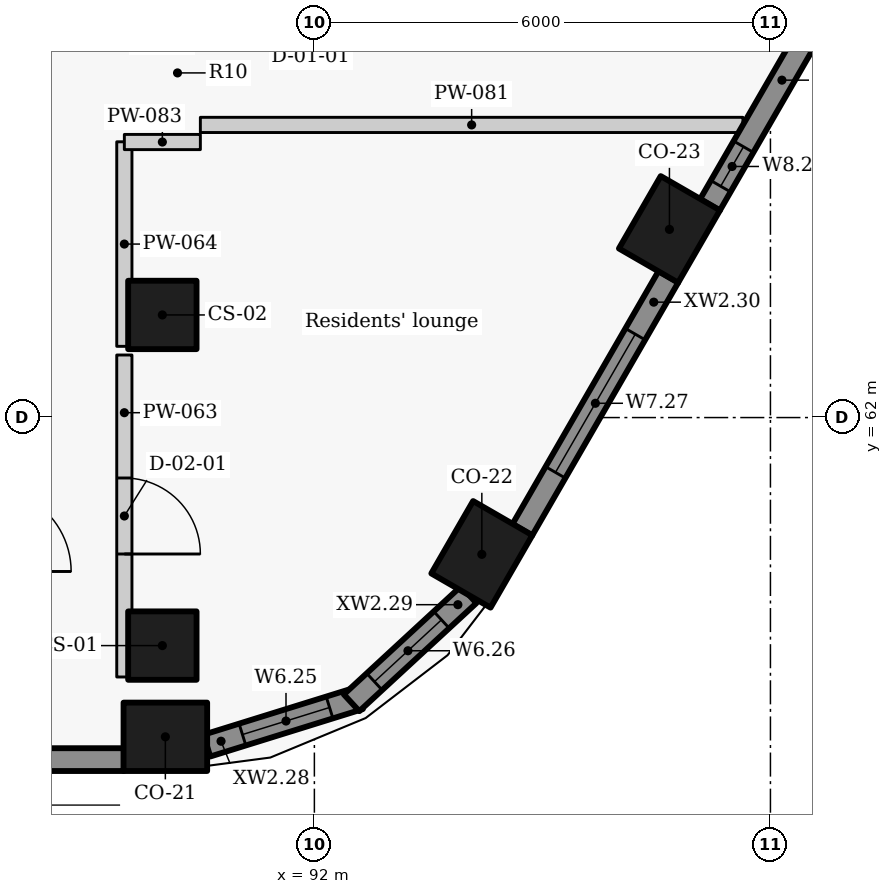
"""IFC4 building model, lengths in metres.
Left out: names, types, materials, properties, quantities, classifications, styles, units other than length and angle.
Written with IfcOpenShell. Run it as: python <this file> out.ifc"""

import sys

from ifc_helpers import new_model, si_unit, direction, frame, frame_2d, origin, origin_2d, place, context, subcontext, project, spatial, rectangle, extrude, element, fill, save


model = new_model("IFC4")
c1 = context("Model", 3, precision=1e-05, world=origin(), true_north=direction((0.0, 1.0)))
c2 = subcontext(c1, "Body", "Model", "MODEL_VIEW")
j1 = project(units=[si_unit("LENGTHUNIT", "METRE"), si_unit("PLANEANGLEUNIT", "RADIAN")], contexts=[c1])
p1 = place(None, origin())
s1 = spatial("IfcSite", under=j1, at=p1, CompositionType="ELEMENT")
p2 = place(p1, origin())
s2 = spatial("IfcBuilding", under=s1, at=p2, CompositionType="ELEMENT")
p3 = place(p2, frame((0.0, 0.0, 226.2)))
s3 = spatial("IfcBuildingStorey", under=s2, at=p3, CompositionType="ELEMENT", Elevation=226.2)
for number, where, z_axis, x_axis in (
    (1, (90.04, 57.8, 0.0), (0.0, 0.0, 1.0), (1.0, 0.0, 0.0)),
    (2, (94.203, 60.2, 0.0), (0.0, 0.0, 1.0), (0.5, 0.866, 0.0)),
    (3, (96.671, 64.475, 0.0), (0.0, 0.0, 1.0), (0.5, 0.866, 0.0)),
):
    element("IfcColumn", number, at=place(p3, frame(where, z_axis=z_axis, x_axis=x_axis)), inside=s3, PredefinedType="COLUMN", context=c2, shape_type="SweptSolid", body=[
        extrude(rectangle(XDim=1.1, YDim=0.9, at=origin_2d()), origin(), (0.0, 0.0, 1.0), 3.3),
    ])
for number, where, z_axis, x_axis in (
    (4, (90.0, 59.0, 0.0), (0.0, 0.0, 1.0), (0.0, 1.0, 0.0)),
    (5, (90.0, 63.35, 0.0), (0.0, 0.0, 1.0), (0.0, 1.0, 0.0)),
):
    element("IfcColumn", number, at=place(p3, frame(where, z_axis=z_axis, x_axis=x_axis)), inside=s3, PredefinedType="COLUMN", context=c2, shape_type="SweptSolid", body=[
        extrude(rectangle(XDim=0.9, YDim=0.9, at=origin_2d()), origin(), (0.0, 0.0, 1.0), 3.3),
    ])
p4 = place(p3, frame((70.501, 57.5, 0.0), z_axis=(0.0, 0.0, 1.0), x_axis=(1.0, 0.0, 0.0)))
e6 = element("IfcWall", 6, at=p4, inside=s3, PredefinedType="SOLIDWALL", context=c2, shape_type="SweptSolid", body=[
    extrude(rectangle(XDim=18.993, YDim=0.3, at=frame_2d((9.496, 0.0))), origin(), (0.0, 0.0, 1.0), 2.425),
])
p5 = place(p3, frame((90.586, 57.684, 0.0), z_axis=(0.0, 0.0, 1.0), x_axis=(0.954941641926, 0.296793632875, 0.0)))
e7 = element("IfcWall", 7, at=p5, inside=s3, PredefinedType="SOLIDWALL", context=c2, shape_type="SweptSolid", body=[
    extrude(rectangle(XDim=2.103, YDim=0.3, at=frame_2d((1.051, 0.0))), origin(), (0.0, 0.0, 1.0), 2.425),
])
p6 = place(p5, frame((0.49, 0.0, 0.9)))
e8 = element("IfcOpeningElement", 8, at=p6, cuts=e7, PredefinedType="OPENING", context=c2, shape_type="SweptSolid", body=[
    extrude(rectangle(XDim=1.2, YDim=1.1, at=frame_2d((0.6, 0.55))), frame((0.0, 0.16, 0.0), z_axis=(0.0, -1.0, 0.0), x_axis=(1.0, 0.0, 0.0)), (0.0, 0.0, 1.0), 0.32),
])
p7 = place(p3, frame((92.49, 58.247, 0.0), z_axis=(0.0, 0.0, 1.0), x_axis=(0.734830223907, 0.678251090698, 0.0)))
e9 = element("IfcWall", 9, at=p7, inside=s3, PredefinedType="SOLIDWALL", context=c2, shape_type="SweptSolid", body=[
    extrude(rectangle(XDim=2.097, YDim=0.3, at=frame_2d((1.049, 0.0))), origin(), (0.0, 0.0, 1.0), 2.425),
])
p8 = place(p7, frame((0.409, 0.0, 0.9)))
e10 = element("IfcOpeningElement", 10, at=p8, cuts=e9, PredefinedType="OPENING", context=c2, shape_type="SweptSolid", body=[
    extrude(rectangle(XDim=1.2, YDim=1.1, at=frame_2d((0.6, 0.55))), frame((0.0, 0.16, 0.0), z_axis=(0.0, -1.0, 0.0), x_axis=(1.0, 0.0, 0.0)), (0.0, 0.0, 1.0), 0.32),
])
p9 = place(p3, frame((94.736, 60.523, 0.0), z_axis=(0.0, 0.0, 1.0), x_axis=(0.499984490703, 0.866034357896, 0.0)))
e11 = element("IfcWall", 11, at=p9, inside=s3, PredefinedType="SOLIDWALL", context=c2, shape_type="SweptSolid", body=[
    extrude(rectangle(XDim=3.844, YDim=0.3, at=frame_2d((1.922, 0.0))), origin(), (0.0, 0.0, 1.0), 2.425),
])
p10 = place(p9, frame((0.872, 0.0, 0.9)))
e12 = element("IfcOpeningElement", 12, at=p10, cuts=e11, PredefinedType="OPENING", context=c2, shape_type="SweptSolid", body=[
    extrude(rectangle(XDim=2.1, YDim=1.1, at=frame_2d((1.05, 0.55))), frame((0.0, 0.16, 0.0), z_axis=(0.0, -1.0, 0.0), x_axis=(1.0, 0.0, 0.0)), (0.0, 0.0, 1.0), 0.32),
])
p11 = place(p3, frame((97.204, 64.798, 0.0), z_axis=(0.0, 0.0, 1.0), x_axis=(0.499984490703, 0.866034357896, 0.0)))
e13 = element("IfcWall", 13, at=p11, inside=s3, PredefinedType="SOLIDWALL", context=c2, shape_type="SweptSolid", body=[
    extrude(rectangle(XDim=3.844, YDim=0.3, at=frame_2d((1.922, 0.0))), origin(), (0.0, 0.0, 1.0), 2.425),
])
p12 = place(p11, frame((0.283, 0.0, 0.9)))
e14 = element("IfcOpeningElement", 14, at=p12, cuts=e13, PredefinedType="OPENING", context=c2, shape_type="SweptSolid", body=[
    extrude(rectangle(XDim=0.6, YDim=1.1, at=frame_2d((0.3, 0.55))), frame((0.0, 0.16, 0.0), z_axis=(0.0, -1.0, 0.0), x_axis=(1.0, 0.0, 0.0)), (0.0, 0.0, 1.0), 0.32),
])
p13 = place(p11, frame((2.906, 0.0, 0.9)))
e15 = element("IfcOpeningElement", 15, at=p13, cuts=e13, PredefinedType="OPENING", context=c2, shape_type="SweptSolid", body=[
    extrude(rectangle(XDim=0.6, YDim=1.1, at=frame_2d((0.3, 0.55))), frame((0.0, 0.16, 0.0), z_axis=(0.0, -1.0, 0.0), x_axis=(1.0, 0.0, 0.0)), (0.0, 0.0, 1.0), 0.32),
])
p14 = place(p3, frame((89.5, 62.823, 0.0), z_axis=(0.0, 0.0, 1.0), x_axis=(0.0, -1.0, 0.0)))
e16 = element("IfcWall", 16, at=p14, inside=s3, PredefinedType="PARTITIONING", context=c2, shape_type="SweptSolid", body=[
    extrude(rectangle(XDim=4.236, YDim=0.2, at=frame_2d((2.118, 0.0))), origin(), (0.0, 0.0, 1.0), 3.025),
])
p15 = place(p14, frame((1.618, 0.0, 0.0)))
e17 = element("IfcOpeningElement", 17, at=p15, cuts=e16, PredefinedType="OPENING", context=c2, shape_type="SweptSolid", body=[
    extrude(rectangle(XDim=1.0, YDim=2.1, at=frame_2d((0.5, 1.05))), frame((0.0, 0.11, 0.0), z_axis=(0.0, -1.0, 0.0), x_axis=(1.0, 0.0, 0.0)), (0.0, 0.0, 1.0), 0.22),
])
p16 = place(p3, frame((89.5, 62.937, 0.0), z_axis=(0.0, 0.0, 1.0), x_axis=(0.0, 1.0, 0.0)))
e18 = element("IfcWall", 18, at=p16, inside=s3, PredefinedType="PARTITIONING", context=c2, shape_type="SweptSolid", body=[
    extrude(rectangle(XDim=2.691, YDim=0.2, at=frame_2d((1.345, 0.0))), origin(), (0.0, 0.0, 1.0), 3.025),
])
p17 = place(p3, frame((90.5, 65.85, 0.0), z_axis=(0.0, 0.0, 1.0), x_axis=(1.0, 0.0, 0.0)))
e19 = element("IfcWall", 19, at=p17, inside=s3, PredefinedType="PARTITIONING", context=c2, shape_type="SweptSolid", body=[
    extrude(rectangle(XDim=7.138, YDim=0.2, at=frame_2d((3.569, 0.0))), origin(), (0.0, 0.0, 1.0), 2.405),
])
p18 = place(p3, frame((89.5, 65.625, 0.0), z_axis=(0.0, 0.0, 1.0), x_axis=(1.0, 0.0, 0.0)))
e20 = element("IfcWall", 20, at=p18, inside=s3, PredefinedType="PARTITIONING", context=c2, shape_type="SweptSolid", body=[
    extrude(rectangle(XDim=1.0, YDim=0.2, at=frame_2d((0.5, 0.0))), origin(), (0.0, 0.0, 1.0), 2.505),
])
p19 = place(p6, origin())
e21 = element("IfcWindow", 21, at=p19, inside=s3, PartitioningType="SINGLE_PANEL", PredefinedType="WINDOW", context=c2, shape_type="SweptSolid", body=[
    extrude(rectangle(XDim=1.2, YDim=1.1, at=frame_2d((0.6, 0.55))), frame((0.0, 0.03, 0.0), z_axis=(0.0, -1.0, 0.0), x_axis=(1.0, 0.0, 0.0)), (0.0, 0.0, 1.0), 0.06),
])
fill(e8, e21)
p20 = place(p8, origin())
e22 = element("IfcWindow", 22, at=p20, inside=s3, PartitioningType="SINGLE_PANEL", PredefinedType="WINDOW", context=c2, shape_type="SweptSolid", body=[
    extrude(rectangle(XDim=1.2, YDim=1.1, at=frame_2d((0.6, 0.55))), frame((0.0, 0.03, 0.0), z_axis=(0.0, -1.0, 0.0), x_axis=(1.0, 0.0, 0.0)), (0.0, 0.0, 1.0), 0.06),
])
fill(e10, e22)
p21 = place(p10, origin())
e23 = element("IfcWindow", 23, at=p21, inside=s3, PartitioningType="SINGLE_PANEL", PredefinedType="WINDOW", context=c2, shape_type="SweptSolid", body=[
    extrude(rectangle(XDim=2.1, YDim=1.1, at=frame_2d((1.05, 0.55))), frame((0.0, 0.03, 0.0), z_axis=(0.0, -1.0, 0.0), x_axis=(1.0, 0.0, 0.0)), (0.0, 0.0, 1.0), 0.06),
])
fill(e12, e23)
p22 = place(p12, origin())
e24 = element("IfcWindow", 24, at=p22, inside=s3, PartitioningType="SINGLE_PANEL", PredefinedType="WINDOW", context=c2, shape_type="SweptSolid", body=[
    extrude(rectangle(XDim=0.6, YDim=1.1, at=frame_2d((0.3, 0.55))), frame((0.0, 0.03, 0.0), z_axis=(0.0, -1.0, 0.0), x_axis=(1.0, 0.0, 0.0)), (0.0, 0.0, 1.0), 0.06),
])
fill(e14, e24)
p23 = place(p15, origin())
e25 = element("IfcDoor", 25, at=p23, inside=s3, OperationType="SINGLE_SWING_RIGHT", PredefinedType="DOOR", context=c2, shape_type="SweptSolid", body=[
    extrude(rectangle(XDim=1.0, YDim=2.1, at=frame_2d((0.5, 1.05))), frame((0.0, 0.025, 0.0), z_axis=(0.0, -1.0, 0.0), x_axis=(1.0, 0.0, 0.0)), (0.0, 0.0, 1.0), 0.05),
])
fill(e17, e25)
save(model, sys.argv[1])
